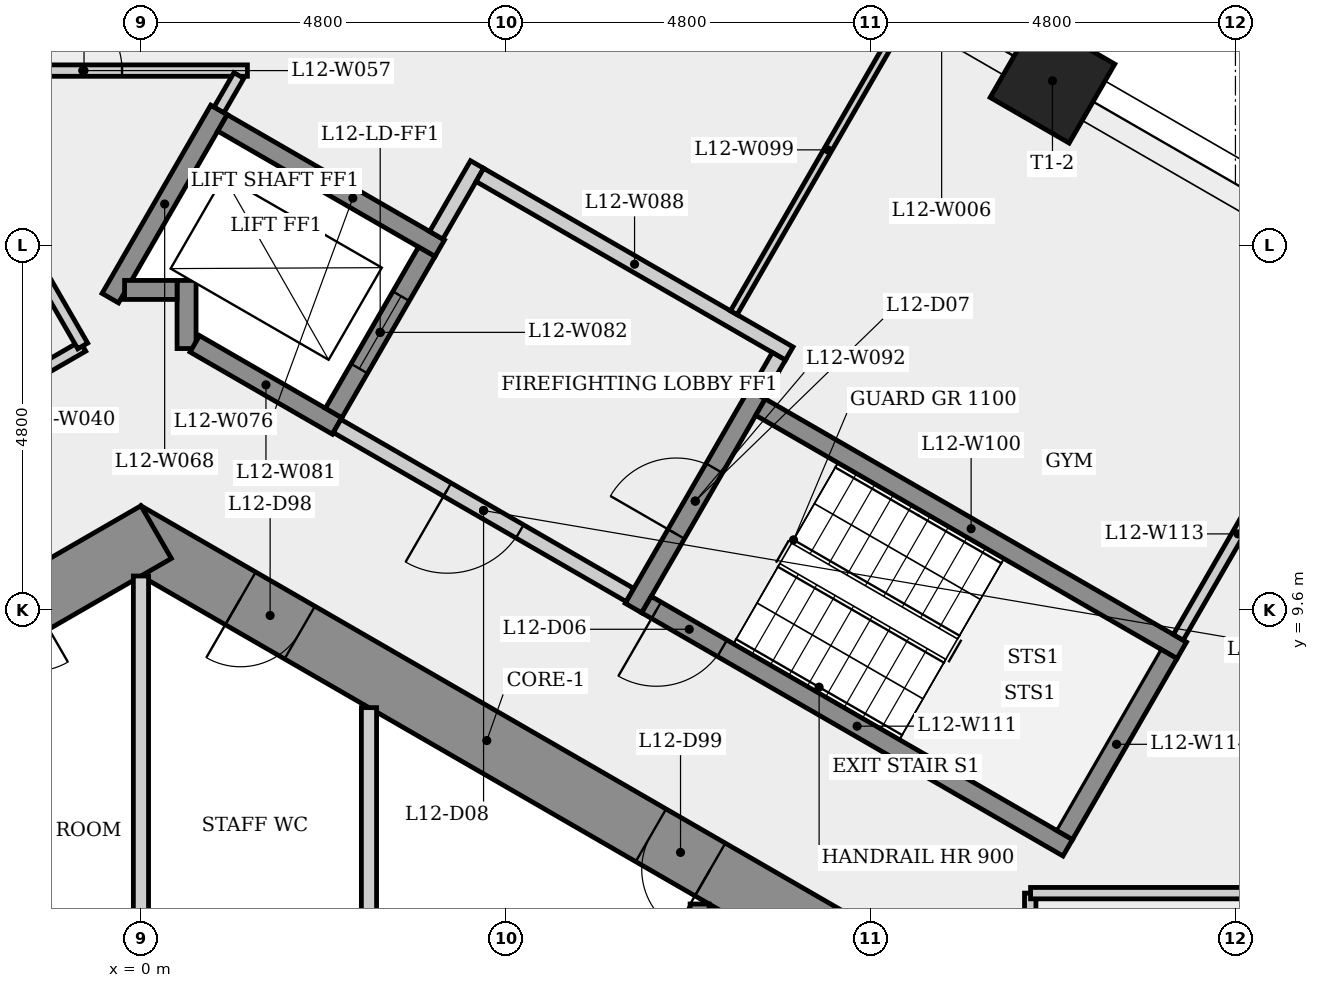
"""IFC4 building model, lengths in metres.
Left out: names, types, materials, properties, quantities, classifications, styles, units other than length and angle.
Written with IfcOpenShell. Run it as: python <this file> out.ifc"""

import sys

from ifc_helpers import new_model, si_unit, direction, frame, frame_2d, origin, origin_2d, place, context, subcontext, project, spatial, rectangle, extrude, element, fill, save


model = new_model("IFC4")
c1 = context("Model", 3, precision=1e-05, world=origin(), true_north=direction((0.0, 1.0)))
c2 = subcontext(c1, "Body", "Model", "MODEL_VIEW")
j1 = project(units=[si_unit("LENGTHUNIT", "METRE"), si_unit("PLANEANGLEUNIT", "RADIAN")], contexts=[c1])
p1 = place(None, origin())
s1 = spatial("IfcSite", under=j1, at=p1, CompositionType="ELEMENT")
p2 = place(p1, origin())
s2 = spatial("IfcBuilding", under=s1, at=p2, CompositionType="ELEMENT")
p3 = place(p2, frame((0.0, 0.0, 49.3)))
s3 = spatial("IfcBuildingStorey", under=s2, at=p3, CompositionType="ELEMENT", Elevation=49.3)
p4 = place(p3, frame((9.3, 5.138, 0.0), z_axis=(0.0, 0.0, 1.0), x_axis=(-0.866023993627, 0.500002442456, 0.0)))
e1 = element("IfcWall", 1, at=p4, inside=s3, PredefinedType="SHEAR", context=c2, shape_type="SweptSolid", body=[
    extrude(rectangle(XDim=10.97, YDim=0.8, at=frame_2d((5.485, 0.0))), origin(), (0.0, 0.0, 1.0), 3.4),
])
p5 = place(p4, frame((8.326, 0.0, 0.0)))
e2 = element("IfcOpeningElement", 2, at=p5, cuts=e1, PredefinedType="OPENING", context=c2, shape_type="SweptSolid", body=[
    extrude(rectangle(XDim=0.9, YDim=2.1, at=frame_2d((0.45, 1.05))), frame((0.0, 0.41, 0.0), z_axis=(0.0, -1.0, 0.0), x_axis=(1.0, 0.0, 0.0)), (0.0, 0.0, 1.0), 0.82),
])
p6 = place(p4, frame((2.091, 0.0, 0.0)))
e3 = element("IfcOpeningElement", 3, at=p6, cuts=e1, PredefinedType="OPENING", context=c2, shape_type="SweptSolid", body=[
    extrude(rectangle(XDim=0.9, YDim=2.1, at=frame_2d((0.45, 1.05))), frame((0.0, 0.41, 0.0), z_axis=(0.0, -1.0, 0.0), x_axis=(1.0, 0.0, 0.0)), (0.0, 0.0, 1.0), 0.82),
])
p7 = place(p3, frame((0.2, 10.623, 0.0), z_axis=(0.0, 0.0, 1.0), x_axis=(-0.866023993627, -0.500002442456, 0.0)))
e4 = element("IfcWall", 4, at=p7, inside=s3, PredefinedType="SHEAR", context=c2, shape_type="SweptSolid", body=[
    extrude(rectangle(XDim=10.97, YDim=0.8, at=frame_2d((5.485, 0.0))), origin(), (0.0, 0.0, 1.0), 3.4),
])
p8 = place(p7, frame((7.944, 0.0, 0.0)))
e5 = element("IfcOpeningElement", 5, at=p8, cuts=e4, PredefinedType="OPENING", context=c2, shape_type="SweptSolid", body=[
    extrude(rectangle(XDim=0.9, YDim=2.1, at=frame_2d((0.45, 1.05))), frame((0.0, 0.41, 0.0), z_axis=(0.0, -1.0, 0.0), x_axis=(1.0, 0.0, 0.0)), (0.0, 0.0, 1.0), 0.82),
])
p9 = place(p7, frame((1.86, 0.0, 0.0)))
e6 = element("IfcOpeningElement", 6, at=p9, cuts=e4, PredefinedType="OPENING", context=c2, shape_type="SweptSolid", body=[
    extrude(rectangle(XDim=0.9, YDim=2.1, at=frame_2d((0.45, 1.05))), frame((0.0, 0.41, 0.0), z_axis=(0.0, -1.0, 0.0), x_axis=(1.0, 0.0, 0.0)), (0.0, 0.0, 1.0), 0.82),
])
p10 = place(p3, frame((11.993, 16.562, 0.0), z_axis=(0.0, 0.0, 1.0), x_axis=(0.5, 0.866025403784, 0.0)))
e7 = element("IfcColumn", 7, at=p10, inside=s3, PredefinedType="COLUMN", context=c2, shape_type="SweptSolid", body=[
    extrude(rectangle(XDim=1.2, YDim=1.2, at=origin_2d()), origin(), (0.0, 0.0, 1.0), 3.4),
])
p11 = place(p3, frame((-10.871, 7.233, 0.0), z_axis=(0.0, 0.0, 1.0), x_axis=(0.866013843593, 0.500020022305, 0.0)))
e8 = element("IfcWall", 8, at=p11, inside=s3, PredefinedType="PARTITIONING", context=c2, shape_type="SweptSolid", body=[
    extrude(rectangle(XDim=11.671, YDim=0.15, at=frame_2d((5.835, 0.0))), origin(), (0.0, 0.0, 1.0), 3.05),
])
p12 = place(p11, frame((4.24, 0.0, 0.0)))
e9 = element("IfcOpeningElement", 9, at=p12, cuts=e8, PredefinedType="OPENING", context=c2, shape_type="SweptSolid", body=[
    extrude(rectangle(XDim=0.9, YDim=2.1, at=frame_2d((0.45, 1.05))), frame((0.0, 0.085, 0.0), z_axis=(0.0, -1.0, 0.0), x_axis=(1.0, 0.0, 0.0)), (0.0, 0.0, 1.0), 0.17),
])
p13 = place(p3, frame((-2.933, 16.696, 0.0), z_axis=(0.0, 0.0, 1.0), x_axis=(1.0, 0.0, 0.0)))
e10 = element("IfcWall", 10, at=p13, inside=s3, PredefinedType="PARTITIONING", context=c2, shape_type="SweptSolid", body=[
    extrude(rectangle(XDim=4.334, YDim=0.15, at=frame_2d((2.167, 0.0))), origin(), (0.0, 0.0, 1.0), 3.05),
])
p14 = place(p13, frame((1.684, 0.0, 0.0)))
e11 = element("IfcOpeningElement", 11, at=p14, cuts=e10, PredefinedType="OPENING", context=c2, shape_type="SweptSolid", body=[
    extrude(rectangle(XDim=1.0, YDim=2.1, at=frame_2d((0.5, 1.05))), frame((0.0, 0.085, 0.0), z_axis=(0.0, -1.0, 0.0), x_axis=(1.0, 0.0, 0.0)), (0.0, 0.0, 1.0), 0.17),
])
p15 = place(p3, frame((-2.821, 16.631, 0.0), z_axis=(0.0, 0.0, 1.0), x_axis=(0.500031070095, -0.866007464714, 0.0)))
e12 = element("IfcWall", 12, at=p15, inside=s3, PredefinedType="PARTITIONING", context=c2, shape_type="SweptSolid", body=[
    extrude(rectangle(XDim=4.109, YDim=0.15, at=frame_2d((2.054, 0.0))), origin(), (0.0, 0.0, 1.0), 3.05),
])
p16 = place(p15, frame((0.492, 0.0, 0.0)))
e13 = element("IfcOpeningElement", 13, at=p16, cuts=e12, PredefinedType="OPENING", context=c2, shape_type="SweptSolid", body=[
    extrude(rectangle(XDim=0.9, YDim=2.1, at=frame_2d((0.45, 1.05))), frame((0.0, 0.085, 0.0), z_axis=(0.0, -1.0, 0.0), x_axis=(1.0, 0.0, 0.0)), (0.0, 0.0, 1.0), 0.17),
])
p17 = place(p3, frame((-0.403, 13.702, 0.0), z_axis=(0.0, 0.0, 1.0), x_axis=(0.499976111731, 0.866039195244, 0.0)))
e14 = element("IfcWall", 14, at=p17, inside=s3, PredefinedType="SHEAR", context=c2, shape_type="SweptSolid", body=[
    extrude(rectangle(XDim=2.861, YDim=0.25, at=frame_2d((1.43, 0.0))), origin(), (0.0, 0.0, 1.0), 3.05),
])
p18 = place(p3, frame((0.0, 10.046, 0.0), z_axis=(0.0, 0.0, 1.0), x_axis=(0.0, -1.0, 0.0)))
e15 = element("IfcWall", 15, at=p18, inside=s3, PredefinedType="PARTITIONING", context=c2, shape_type="SweptSolid", body=[
    extrude(rectangle(XDim=4.771, YDim=0.2, at=frame_2d((2.385, 0.0))), origin(), (0.0, 0.0, 1.0), 3.05),
])
p19 = place(p3, frame((0.6, 13.039, 0.0), z_axis=(0.0, 0.0, 1.0), x_axis=(0.0, 1.0, 0.0)))
e16 = element("IfcWall", 16, at=p19, inside=s3, PredefinedType="SHEAR", context=c2, shape_type="SweptSolid", body=[
    extrude(rectangle(XDim=0.896, YDim=0.25, at=frame_2d((0.448, 0.0))), origin(), (0.0, 0.0, 1.0), 3.05),
])
p20 = place(p3, frame((0.475, 13.81, 0.0), z_axis=(0.0, 0.0, 1.0), x_axis=(-1.0, 0.0, 0.0)))
e17 = element("IfcWall", 17, at=p20, inside=s3, PredefinedType="SHEAR", context=c2, shape_type="SweptSolid", body=[
    extrude(rectangle(XDim=0.691, YDim=0.25, at=frame_2d((0.345, 0.0))), origin(), (0.0, 0.0, 1.0), 3.4),
])
p21 = place(p3, frame((1.073, 16.008, 0.0), z_axis=(0.0, 0.0, 1.0), x_axis=(0.866040211805, -0.499974350878, 0.0)))
e18 = element("IfcWall", 18, at=p21, inside=s3, PredefinedType="SHEAR", context=c2, shape_type="SweptSolid", body=[
    extrude(rectangle(XDim=3.3, YDim=0.25, at=frame_2d((1.65, 0.0))), origin(), (0.0, 0.0, 1.0), 3.05),
])
p22 = place(p3, frame((1.288, 16.631, 0.0), z_axis=(0.0, 0.0, 1.0), x_axis=(-0.499911367677, -0.866076569633, 0.0)))
e19 = element("IfcWall", 19, at=p22, inside=s3, PredefinedType="PARTITIONING", context=c2, shape_type="SweptSolid", body=[
    extrude(rectangle(XDim=0.522, YDim=0.15, at=frame_2d((0.261, 0.0))), origin(), (0.0, 0.0, 1.0), 3.05),
])
p23 = place(p3, frame((2.581, 12.02, 0.0), z_axis=(0.0, 0.0, 1.0), x_axis=(-0.86603892542, 0.499976579108, 0.0)))
e20 = element("IfcWall", 20, at=p23, inside=s3, PredefinedType="SHEAR", context=c2, shape_type="SweptSolid", body=[
    extrude(rectangle(XDim=2.162, YDim=0.25, at=frame_2d((1.081, 0.0))), origin(), (0.0, 0.0, 1.0), 3.05),
])
p24 = place(p3, frame((2.535, 12.191, 0.0), z_axis=(0.0, 0.0, 1.0), x_axis=(0.500061746146, 0.865989751695, 0.0)))
e21 = element("IfcWall", 21, at=p24, inside=s3, PredefinedType="SHEAR", context=c2, shape_type="SweptSolid", body=[
    extrude(rectangle(XDim=2.45, YDim=0.25, at=frame_2d((1.225, 0.0))), origin(), (0.0, 0.0, 1.0), 3.4),
])
p25 = place(p24, frame((0.675, 0.0, 0.0)))
e22 = element("IfcOpeningElement", 22, at=p25, cuts=e21, PredefinedType="OPENING", context=c2, shape_type="SweptSolid", body=[
    extrude(rectangle(XDim=1.1, YDim=2.1, at=frame_2d((0.55, 1.05))), frame((0.0, 0.135, 0.0), z_axis=(0.0, -1.0, 0.0), x_axis=(1.0, 0.0, 0.0)), (0.0, 0.0, 1.0), 0.27),
])
p26 = place(p3, frame((3.0, 8.314, 0.0), z_axis=(0.0, 0.0, 1.0), x_axis=(0.0, -1.0, 0.0)))
e23 = element("IfcWall", 23, at=p26, inside=s3, PredefinedType="PARTITIONING", context=c2, shape_type="SweptSolid", body=[
    extrude(rectangle(XDim=3.039, YDim=0.2, at=frame_2d((1.52, 0.0))), origin(), (0.0, 0.0, 1.0), 3.05),
])
p27 = place(p3, frame((3.885, 14.529, 0.0), z_axis=(0.0, 0.0, 1.0), x_axis=(0.499997628298, 0.866026773083, 0.0)))
e24 = element("IfcWall", 24, at=p27, inside=s3, PredefinedType="PARTITIONING", context=c2, shape_type="SweptSolid", body=[
    extrude(rectangle(XDim=1.075, YDim=0.2, at=frame_2d((0.538, 0.0))), origin(), (0.0, 0.0, 1.0), 3.05),
])
p28 = place(p3, frame((4.459, 15.323, 0.0), z_axis=(0.0, 0.0, 1.0), x_axis=(0.866016039709, -0.500016218704, 0.0)))
e25 = element("IfcWall", 25, at=p28, inside=s3, PredefinedType="PARTITIONING", context=c2, shape_type="SweptSolid", body=[
    extrude(rectangle(XDim=4.7, YDim=0.2, at=frame_2d((2.35, 0.0))), origin(), (0.0, 0.0, 1.0), 3.05),
])
p29 = place(p3, frame((6.435, 9.795, 0.0), z_axis=(0.0, 0.0, 1.0), x_axis=(-0.866012907634, 0.500021643343, 0.0)))
e26 = element("IfcWall", 26, at=p29, inside=s3, PredefinedType="PARTITIONING", context=c2, shape_type="SweptSolid", body=[
    extrude(rectangle(XDim=4.45, YDim=0.2, at=frame_2d((2.225, 0.0))), origin(), (0.0, 0.0, 1.0), 3.05),
])
p30 = place(p29, frame((1.675, 0.0, 0.0)))
e27 = element("IfcOpeningElement", 27, at=p30, cuts=e26, PredefinedType="OPENING", context=c2, shape_type="SweptSolid", body=[
    extrude(rectangle(XDim=1.1, YDim=2.1, at=frame_2d((0.55, 1.05))), frame((0.0, 0.11, 0.0), z_axis=(0.0, -1.0, 0.0), x_axis=(1.0, 0.0, 0.0)), (0.0, 0.0, 1.0), 0.22),
])
p31 = place(p3, frame((6.48, 9.624, 0.0), z_axis=(0.0, 0.0, 1.0), x_axis=(0.500017246033, 0.866015446554, 0.0)))
e28 = element("IfcWall", 28, at=p31, inside=s3, PredefinedType="SHEAR", context=c2, shape_type="SweptSolid", body=[
    extrude(rectangle(XDim=3.25, YDim=0.25, at=frame_2d((1.625, 0.0))), origin(), (0.0, 0.0, 1.0), 3.05),
])
p32 = place(p31, frame((1.125, 0.0, 0.0)))
e29 = element("IfcOpeningElement", 29, at=p32, cuts=e28, PredefinedType="OPENING", context=c2, shape_type="SweptSolid", body=[
    extrude(rectangle(XDim=1.0, YDim=2.1, at=frame_2d((0.5, 1.05))), frame((0.0, 0.135, 0.0), z_axis=(0.0, -1.0, 0.0), x_axis=(1.0, 0.0, 0.0)), (0.0, 0.0, 1.0), 0.27),
])
p33 = place(p3, frame((7.35, 5.73, 0.0), z_axis=(0.0, 0.0, 1.0), x_axis=(0.0, -1.0, 0.0)))
e30 = element("IfcWall", 30, at=p33, inside=s3, PredefinedType="SHEAR", context=c2, shape_type="SweptSolid", body=[
    extrude(rectangle(XDim=3.805, YDim=0.25, at=frame_2d((1.903, 0.0))), origin(), (0.0, 0.0, 1.0), 3.05),
])
p34 = place(p3, frame((7.8, 13.51, 0.0), z_axis=(0.0, 0.0, 1.0), x_axis=(0.500001430823, 0.866024577697, 0.0)))
e31 = element("IfcWall", 31, at=p34, inside=s3, PredefinedType="PARTITIONING", context=c2, shape_type="SweptSolid", body=[
    extrude(rectangle(XDim=4.949, YDim=0.1, at=frame_2d((2.475, 0.0))), origin(), (0.0, 0.0, 1.0), 3.05),
])
p35 = place(p3, frame((8.151, 12.268, 0.0), z_axis=(0.0, 0.0, 1.0), x_axis=(0.866025499775, -0.499999833739, 0.0)))
e32 = element("IfcWall", 32, at=p35, inside=s3, PredefinedType="SHEAR", context=c2, shape_type="SweptSolid", body=[
    extrude(rectangle(XDim=6.4, YDim=0.25, at=frame_2d((3.2, 0.0))), origin(), (0.0, 0.0, 1.0), 3.05),
])
p36 = place(p3, frame((8.393, 12.937, 0.0), z_axis=(0.0, 0.0, 1.0), x_axis=(-0.500065409566, -0.86598763626, 0.0)))
e33 = element("IfcWall", 33, at=p36, inside=s3, PredefinedType="PARTITIONING", context=c2, shape_type="SweptSolid", body=[
    extrude(rectangle(XDim=0.575, YDim=0.2, at=frame_2d((0.288, 0.0))), origin(), (0.0, 0.0, 1.0), 3.05),
])
p37 = place(p3, frame((11.7, 5.873, 0.0), z_axis=(0.0, 0.0, 1.0), x_axis=(0.0, -1.0, 0.0)))
e34 = element("IfcWall", 34, at=p37, inside=s3, PredefinedType="PARTITIONING", context=c2, shape_type="SweptSolid", body=[
    extrude(rectangle(XDim=11.671, YDim=0.15, at=frame_2d((5.835, 0.0))), origin(), (0.0, 0.0, 1.0), 3.05),
])
p38 = place(p37, frame((5.336, 0.0, 0.0)))
e35 = element("IfcOpeningElement", 35, at=p38, cuts=e34, PredefinedType="OPENING", context=c2, shape_type="SweptSolid", body=[
    extrude(rectangle(XDim=1.0, YDim=2.1, at=frame_2d((0.5, 1.05))), frame((0.0, 0.085, 0.0), z_axis=(0.0, -1.0, 0.0), x_axis=(1.0, 0.0, 0.0)), (0.0, 0.0, 1.0), 0.17),
])
p39 = place(p3, frame((12.194, 6.47, 0.0), z_axis=(0.0, 0.0, 1.0), x_axis=(-0.866025499775, 0.499999833739, 0.0)))
e36 = element("IfcWall", 36, at=p39, inside=s3, PredefinedType="SHEAR", context=c2, shape_type="SweptSolid", body=[
    extrude(rectangle(XDim=6.4, YDim=0.25, at=frame_2d((3.2, 0.0))), origin(), (0.0, 0.0, 1.0), 3.05),
])
p40 = place(p39, frame((5.25, 0.0, 0.0)))
e37 = element("IfcOpeningElement", 37, at=p40, cuts=e36, PredefinedType="OPENING", context=c2, shape_type="SweptSolid", body=[
    extrude(rectangle(XDim=1.0, YDim=2.1, at=frame_2d((0.5, 1.05))), frame((0.0, 0.135, 0.0), z_axis=(0.0, -1.0, 0.0), x_axis=(1.0, 0.0, 0.0)), (0.0, 0.0, 1.0), 0.27),
])
p41 = place(p3, frame((13.648, 9.239, 0.0), z_axis=(0.0, 0.0, 1.0), x_axis=(0.500031717574, 0.86600709086, 0.0)))
e38 = element("IfcWall", 38, at=p41, inside=s3, PredefinedType="PARTITIONING", context=c2, shape_type="SweptSolid", body=[
    extrude(rectangle(XDim=3.143, YDim=0.15, at=frame_2d((1.572, 0.0))), origin(), (0.0, 0.0, 1.0), 3.05),
])
p42 = place(p3, frame((13.523, 9.022, 0.0), z_axis=(0.0, 0.0, 1.0), x_axis=(-0.500034990121, -0.866005201286, 0.0)))
e39 = element("IfcWall", 39, at=p42, inside=s3, PredefinedType="SHEAR", context=c2, shape_type="SweptSolid", body=[
    extrude(rectangle(XDim=2.75, YDim=0.25, at=frame_2d((1.375, 0.0))), origin(), (0.0, 0.0, 1.0), 3.05),
])
p43 = place(p3, frame((18.584, 5.873, 0.0), z_axis=(0.0, 0.0, 1.0), x_axis=(-1.0, 0.0, 0.0)))
e40 = element("IfcWall", 40, at=p43, inside=s3, PredefinedType="PARTITIONING", context=c2, shape_type="SweptSolid", body=[
    extrude(rectangle(XDim=6.88, YDim=0.15, at=frame_2d((3.44, 0.0))), origin(), (0.0, 0.0, 1.0), 3.05),
])
p44 = place(p40, origin())
e41 = element("IfcDoor", 41, at=p44, inside=s3, OperationType="SINGLE_SWING_RIGHT", PredefinedType="DOOR", context=c2, shape_type="SweptSolid", body=[
    extrude(rectangle(XDim=1.0, YDim=2.1, at=frame_2d((0.5, 1.05))), frame((0.0, 0.025, 0.0), z_axis=(0.0, -1.0, 0.0), x_axis=(1.0, 0.0, 0.0)), (0.0, 0.0, 1.0), 0.05),
])
fill(e37, e41)
p45 = place(p32, origin())
e42 = element("IfcDoor", 42, at=p45, inside=s3, OperationType="SINGLE_SWING_LEFT", PredefinedType="DOOR", context=c2, shape_type="SweptSolid", body=[
    extrude(rectangle(XDim=1.0, YDim=2.1, at=frame_2d((0.5, 1.05))), frame((0.0, 0.025, 0.0), z_axis=(0.0, -1.0, 0.0), x_axis=(1.0, 0.0, 0.0)), (0.0, 0.0, 1.0), 0.05),
])
fill(e29, e42)
p46 = place(p30, origin())
e43 = element("IfcDoor", 43, at=p46, inside=s3, OperationType="SINGLE_SWING_RIGHT", PredefinedType="DOOR", context=c2, shape_type="SweptSolid", body=[
    extrude(rectangle(XDim=1.1, YDim=2.1, at=frame_2d((0.55, 1.05))), frame((0.0, 0.025, 0.0), z_axis=(0.0, -1.0, 0.0), x_axis=(1.0, 0.0, 0.0)), (0.0, 0.0, 1.0), 0.05),
])
fill(e27, e43)
p47 = place(p25, origin())
e44 = element("IfcDoor", 44, at=p47, inside=s3, OperationType="SLIDING_TO_LEFT", PredefinedType="DOOR", context=c2, shape_type="SweptSolid", body=[
    extrude(rectangle(XDim=1.1, YDim=2.1, at=frame_2d((0.55, 1.05))), frame((0.0, 0.025, 0.0), z_axis=(0.0, -1.0, 0.0), x_axis=(1.0, 0.0, 0.0)), (0.0, 0.0, 1.0), 0.05),
])
fill(e22, e44)
p48 = place(p14, origin())
e45 = element("IfcDoor", 45, at=p48, inside=s3, OperationType="SINGLE_SWING_LEFT", PredefinedType="DOOR", context=c2, shape_type="SweptSolid", body=[
    extrude(rectangle(XDim=1.0, YDim=2.1, at=frame_2d((0.5, 1.05))), frame((0.0, 0.025, 0.0), z_axis=(0.0, -1.0, 0.0), x_axis=(1.0, 0.0, 0.0)), (0.0, 0.0, 1.0), 0.05),
])
fill(e11, e45)
p49 = place(p5, origin())
e46 = element("IfcDoor", 46, at=p49, inside=s3, OperationType="SINGLE_SWING_RIGHT", PredefinedType="DOOR", context=c2, shape_type="SweptSolid", body=[
    extrude(rectangle(XDim=0.9, YDim=2.1, at=frame_2d((0.45, 1.05))), frame((0.0, 0.025, 0.0), z_axis=(0.0, -1.0, 0.0), x_axis=(1.0, 0.0, 0.0)), (0.0, 0.0, 1.0), 0.05),
])
fill(e2, e46)
p50 = place(p6, origin())
e47 = element("IfcDoor", 47, at=p50, inside=s3, OperationType="SINGLE_SWING_LEFT", PredefinedType="DOOR", context=c2, shape_type="SweptSolid", body=[
    extrude(rectangle(XDim=0.9, YDim=2.1, at=frame_2d((0.45, 1.05))), frame((0.0, 0.025, 0.0), z_axis=(0.0, -1.0, 0.0), x_axis=(1.0, 0.0, 0.0)), (0.0, 0.0, 1.0), 0.05),
])
fill(e3, e47)
save(model, sys.argv[1])
